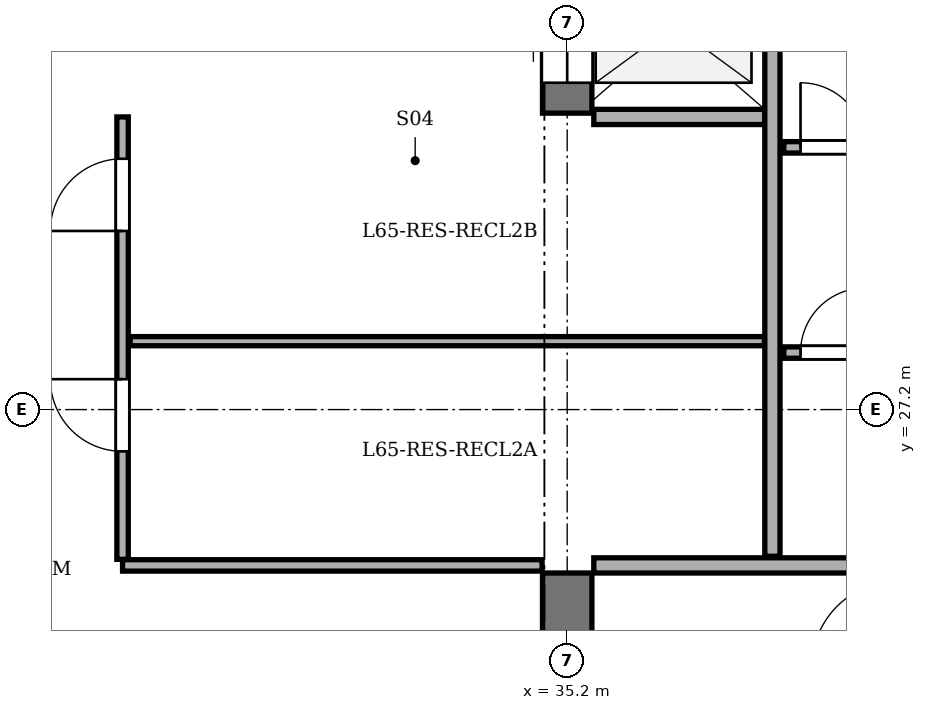
"""IFC4 building model, lengths in metres.
Left out: names, types, materials, properties, quantities, classifications, styles, units other than length and angle.
Written with IfcOpenShell. Run it as: python <this file> out.ifc"""

import sys

from ifc_helpers import new_model, si_unit, direction, frame, frame_2d, origin, place, context, subcontext, project, spatial, rectangle, extrude, element, fill, save


model = new_model("IFC4")
c1 = context("Model", 3, precision=1e-05, world=origin(), true_north=direction((0.0, 1.0)))
c2 = subcontext(c1, "Body", "Model", "MODEL_VIEW")
j1 = project(units=[si_unit("LENGTHUNIT", "METRE"), si_unit("PLANEANGLEUNIT", "RADIAN")], contexts=[c1])
p1 = place(None, origin())
s1 = spatial("IfcSite", under=j1, at=p1, CompositionType="ELEMENT")
p2 = place(p1, origin())
s2 = spatial("IfcBuilding", under=s1, at=p2, CompositionType="ELEMENT")
p3 = place(p2, frame((0.0, 0.0, 248.3)))
s3 = spatial("IfcBuildingStorey", under=s2, at=p3, CompositionType="ELEMENT", Elevation=248.3)
p4 = place(p3, frame((35.2, 21.18, 0.0), z_axis=(0.0, 0.0, 1.0), x_axis=(0.0, 1.0, 0.0)))
e1 = element("IfcWall", 1, at=p4, inside=s3, PredefinedType="SHEAR", context=c2, shape_type="SweptSolid", body=[
    extrude(rectangle(XDim=3.87, YDim=0.65, at=frame_2d((1.935, 0.0))), origin(), (0.0, 0.0, 1.0), 3.1),
])
p5 = place(p4, frame((1.42, 0.0, 0.0)))
e2 = element("IfcOpeningElement", 2, at=p5, cuts=e1, PredefinedType="OPENING", context=c2, shape_type="SweptSolid", body=[
    extrude(rectangle(XDim=1.2, YDim=2.15, at=frame_2d((0.6, 1.075))), frame((0.0, 0.335, 0.0), z_axis=(0.0, -1.0, 0.0), x_axis=(1.0, 0.0, 0.0)), (0.0, 0.0, 1.0), 0.67),
])
p6 = place(p3, frame((35.2, 31.1, 0.0), z_axis=(0.0, 0.0, 1.0), x_axis=(0.0, 1.0, 0.0)))
e3 = element("IfcWall", 3, at=p6, inside=s3, PredefinedType="SHEAR", context=c2, shape_type="SweptSolid", body=[
    extrude(rectangle(XDim=2.12, YDim=0.65, at=frame_2d((1.06, 0.0))), origin(), (0.0, 0.0, 1.0), 3.1),
])
p7 = place(p6, frame((0.4, 0.0, 0.0)))
e4 = element("IfcOpeningElement", 4, at=p7, cuts=e3, PredefinedType="OPENING", context=c2, shape_type="SweptSolid", body=[
    extrude(rectangle(XDim=1.1, YDim=2.1, at=frame_2d((0.55, 1.05))), frame((0.0, 0.335, 0.0), z_axis=(0.0, -1.0, 0.0), x_axis=(1.0, 0.0, 0.0)), (0.0, 0.0, 1.0), 0.67),
])
p8 = place(p3, frame((35.55, 25.15, 0.0), z_axis=(0.0, 0.0, 1.0), x_axis=(1.0, 0.0, 0.0)))
e5 = element("IfcWall", 5, at=p8, inside=s3, PredefinedType="SOLIDWALL", context=c2, shape_type="SweptSolid", body=[
    extrude(rectangle(XDim=3.85, YDim=0.2, at=frame_2d((1.925, 0.0))), origin(), (0.0, 0.0, 1.0), 3.1),
])
p9 = place(p3, frame((35.55, 31.05, 0.0), z_axis=(0.0, 0.0, 1.0), x_axis=(1.0, 0.0, 0.0)))
e6 = element("IfcWall", 6, at=p9, inside=s3, PredefinedType="SOLIDWALL", context=c2, shape_type="SweptSolid", body=[
    extrude(rectangle(XDim=2.25, YDim=0.2, at=frame_2d((1.125, 0.0))), origin(), (0.0, 0.0, 1.0), 3.1),
])
p10 = place(p3, frame((37.9, 25.27, 0.0), z_axis=(0.0, 0.0, 1.0), x_axis=(0.0, 1.0, 0.0)))
e7 = element("IfcWall", 7, at=p10, inside=s3, PredefinedType="SOLIDWALL", context=c2, shape_type="SweptSolid", body=[
    extrude(rectangle(XDim=7.995, YDim=0.2, at=frame_2d((3.998, 0.0))), origin(), (0.0, 0.0, 1.0), 3.1),
])
p11 = place(p3, frame((38.05, 27.95, 0.0), z_axis=(0.0, 0.0, 1.0), x_axis=(1.0, 0.0, 0.0)))
e8 = element("IfcWall", 8, at=p11, inside=s3, PredefinedType="PARTITIONING", context=c2, shape_type="SweptSolid", body=[
    extrude(rectangle(XDim=1.3, YDim=0.15, at=frame_2d((0.65, 0.0))), origin(), (0.0, 0.0, 1.0), 3.1),
])
p12 = place(p11, frame((0.22, 0.0, 0.0)))
e9 = element("IfcOpeningElement", 9, at=p12, cuts=e8, PredefinedType="OPENING", context=c2, shape_type="SweptSolid", body=[
    extrude(rectangle(XDim=0.85, YDim=2.02, at=frame_2d((0.425, 1.01))), frame((0.0, 0.085, 0.0), z_axis=(0.0, -1.0, 0.0), x_axis=(1.0, 0.0, 0.0)), (0.0, 0.0, 1.0), 0.17),
])
p13 = place(p3, frame((38.05, 30.65, 0.0), z_axis=(0.0, 0.0, 1.0), x_axis=(1.0, 0.0, 0.0)))
e10 = element("IfcWall", 10, at=p13, inside=s3, PredefinedType="PARTITIONING", context=c2, shape_type="SweptSolid", body=[
    extrude(rectangle(XDim=1.3, YDim=0.15, at=frame_2d((0.65, 0.0))), origin(), (0.0, 0.0, 1.0), 3.1),
])
p14 = place(p13, frame((0.22, 0.0, 0.0)))
e11 = element("IfcOpeningElement", 11, at=p14, cuts=e10, PredefinedType="OPENING", context=c2, shape_type="SweptSolid", body=[
    extrude(rectangle(XDim=0.85, YDim=2.02, at=frame_2d((0.425, 1.01))), frame((0.0, 0.085, 0.0), z_axis=(0.0, -1.0, 0.0), x_axis=(1.0, 0.0, 0.0)), (0.0, 0.0, 1.0), 0.17),
])
p15 = place(p3, frame((29.35, 25.15, 0.0), z_axis=(0.0, 0.0, 1.0), x_axis=(1.0, 0.0, 0.0)))
e12 = element("IfcWall", 12, at=p15, inside=s3, PredefinedType="PARTITIONING", context=c2, shape_type="SweptSolid", body=[
    extrude(rectangle(XDim=5.52, YDim=0.15, at=frame_2d((2.76, 0.0))), origin(), (0.0, 0.0, 1.0), 3.1),
])
p16 = place(p3, frame((29.35, 25.23, 0.0), z_axis=(0.0, 0.0, 1.0), x_axis=(0.0, 1.0, 0.0)))
e13 = element("IfcWall", 13, at=p16, inside=s3, PredefinedType="PARTITIONING", context=c2, shape_type="SweptSolid", body=[
    extrude(rectangle(XDim=5.82, YDim=0.15, at=frame_2d((2.91, 0.0))), origin(), (0.0, 0.0, 1.0), 3.1),
])
p17 = place(p16, frame((1.42, 0.0, 0.0)))
e14 = element("IfcOpeningElement", 14, at=p17, cuts=e13, PredefinedType="OPENING", context=c2, shape_type="SweptSolid", body=[
    extrude(rectangle(XDim=0.95, YDim=2.1, at=frame_2d((0.475, 1.05))), frame((0.0, 0.085, 0.0), z_axis=(0.0, -1.0, 0.0), x_axis=(1.0, 0.0, 0.0)), (0.0, 0.0, 1.0), 0.17),
])
p18 = place(p16, frame((4.32, 0.0, 0.0)))
e15 = element("IfcOpeningElement", 15, at=p18, cuts=e13, PredefinedType="OPENING", context=c2, shape_type="SweptSolid", body=[
    extrude(rectangle(XDim=0.95, YDim=2.1, at=frame_2d((0.475, 1.05))), frame((0.0, 0.085, 0.0), z_axis=(0.0, -1.0, 0.0), x_axis=(1.0, 0.0, 0.0)), (0.0, 0.0, 1.0), 0.17),
])
p19 = place(p3, frame((29.45, 28.1, 0.0), z_axis=(0.0, 0.0, 1.0), x_axis=(1.0, 0.0, 0.0)))
e16 = element("IfcWall", 16, at=p19, inside=s3, PredefinedType="PARTITIONING", context=c2, shape_type="SweptSolid", body=[
    extrude(rectangle(XDim=8.345, YDim=0.12, at=frame_2d((4.172, 0.0))), origin(), (0.0, 0.0, 1.0), 3.1),
])
p20 = place(p7, origin())
e17 = element("IfcDoor", 17, at=p20, inside=s3, OperationType="DOUBLE_DOOR_SLIDING", PredefinedType="DOOR", context=c2, shape_type="SweptSolid", body=[
    extrude(rectangle(XDim=1.1, YDim=2.1, at=frame_2d((0.55, 1.05))), frame((0.0, 0.025, 0.0), z_axis=(0.0, -1.0, 0.0), x_axis=(1.0, 0.0, 0.0)), (0.0, 0.0, 1.0), 0.05),
])
fill(e4, e17)
p21 = place(p12, origin())
e18 = element("IfcDoor", 18, at=p21, inside=s3, OperationType="SINGLE_SWING_RIGHT", PredefinedType="DOOR", context=c2, shape_type="SweptSolid", body=[
    extrude(rectangle(XDim=0.85, YDim=2.02, at=frame_2d((0.425, 1.01))), frame((0.0, 0.025, 0.0), z_axis=(0.0, -1.0, 0.0), x_axis=(1.0, 0.0, 0.0)), (0.0, 0.0, 1.0), 0.05),
])
fill(e9, e18)
p22 = place(p14, origin())
e19 = element("IfcDoor", 19, at=p22, inside=s3, OperationType="SINGLE_SWING_LEFT", PredefinedType="DOOR", context=c2, shape_type="SweptSolid", body=[
    extrude(rectangle(XDim=0.85, YDim=2.02, at=frame_2d((0.425, 1.01))), frame((0.0, 0.025, 0.0), z_axis=(0.0, -1.0, 0.0), x_axis=(1.0, 0.0, 0.0)), (0.0, 0.0, 1.0), 0.05),
])
fill(e11, e19)
p23 = place(p17, origin())
e20 = element("IfcDoor", 20, at=p23, inside=s3, OperationType="SINGLE_SWING_RIGHT", PredefinedType="DOOR", context=c2, shape_type="SweptSolid", body=[
    extrude(rectangle(XDim=0.95, YDim=2.1, at=frame_2d((0.475, 1.05))), frame((0.0, 0.025, 0.0), z_axis=(0.0, -1.0, 0.0), x_axis=(1.0, 0.0, 0.0)), (0.0, 0.0, 1.0), 0.05),
])
fill(e14, e20)
p24 = place(p18, origin())
e21 = element("IfcDoor", 21, at=p24, inside=s3, OperationType="SINGLE_SWING_LEFT", PredefinedType="DOOR", context=c2, shape_type="SweptSolid", body=[
    extrude(rectangle(XDim=0.95, YDim=2.1, at=frame_2d((0.475, 1.05))), frame((0.0, 0.025, 0.0), z_axis=(0.0, -1.0, 0.0), x_axis=(1.0, 0.0, 0.0)), (0.0, 0.0, 1.0), 0.05),
])
fill(e15, e21)
save(model, sys.argv[1])
